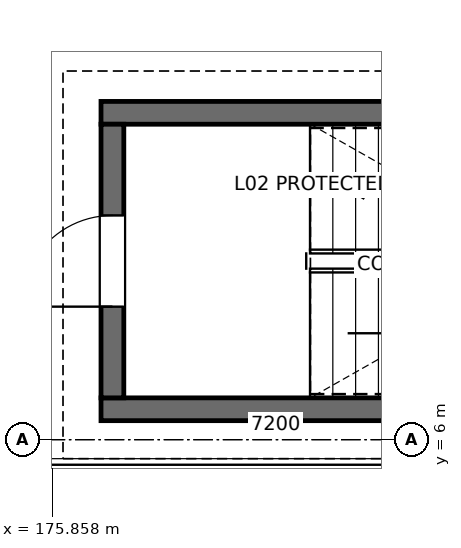
"""IFC4 building model, lengths in metres.
Left out: names, types, materials, properties, quantities, classifications, styles, units other than length and angle.
Written with IfcOpenShell. Run it as: python <this file> out.ifc"""

import sys

from ifc_helpers import new_model, si_unit, direction, frame, frame_2d, origin, place, context, subcontext, project, spatial, rectangle, extrude, element, fill, save


model = new_model("IFC4")
c1 = context("Model", 3, precision=1e-05, world=origin(), true_north=direction((0.0, 1.0)))
c2 = subcontext(c1, "Body", "Model", "MODEL_VIEW")
j1 = project(units=[si_unit("LENGTHUNIT", "METRE"), si_unit("PLANEANGLEUNIT", "RADIAN")], contexts=[c1])
p1 = place(None, origin())
s1 = spatial("IfcSite", under=j1, at=p1, CompositionType="ELEMENT")
p2 = place(p1, origin())
s2 = spatial("IfcBuilding", under=s1, at=p2, CompositionType="ELEMENT")
p3 = place(p2, frame((0.0, 0.0, 9.3)))
s3 = spatial("IfcBuildingStorey", under=s2, at=p3, CompositionType="ELEMENT", Elevation=9.3)
for number, where, z_axis, x_axis in (
    (1, (185.9, 6.4, 0.0), (0.0, 0.0, 1.0), (-1.0, 0.0, 0.0)),
    (2, (176.5, 10.3, 0.0), (0.0, 0.0, 1.0), (1.0, 0.0, 0.0)),
):
    element("IfcWall", number, at=place(p3, frame(where, z_axis=z_axis, x_axis=x_axis)), inside=s3, PredefinedType="SOLIDWALL", context=c2, shape_type="SweptSolid", body=[
        extrude(rectangle(XDim=9.4, YDim=0.3, at=frame_2d((4.7, 0.0))), origin(), (0.0, 0.0, 1.0), 3.6),
    ])
p4 = place(p3, frame((176.65, 6.55, 0.0), z_axis=(0.0, 0.0, 1.0), x_axis=(0.0, 1.0, 0.0)))
e3 = element("IfcWall", 3, at=p4, inside=s3, PredefinedType="SOLIDWALL", context=c2, shape_type="SweptSolid", body=[
    extrude(rectangle(XDim=3.6, YDim=0.3, at=frame_2d((1.8, 0.0))), origin(), (0.0, 0.0, 1.0), 3.6),
])
p5 = place(p4, frame((1.2, 0.0, 0.0)))
e4 = element("IfcOpeningElement", 4, at=p5, cuts=e3, PredefinedType="OPENING", context=c2, shape_type="SweptSolid", body=[
    extrude(rectangle(XDim=1.2, YDim=2.2, at=frame_2d((0.6, 1.1))), frame((0.0, 0.16, 0.0), z_axis=(0.0, -1.0, 0.0), x_axis=(1.0, 0.0, 0.0)), (0.0, 0.0, 1.0), 0.32),
])
p6 = place(p5, origin())
e5 = element("IfcDoor", 5, at=p6, inside=s3, OperationType="SINGLE_SWING_LEFT", PredefinedType="DOOR", context=c2, shape_type="SweptSolid", body=[
    extrude(rectangle(XDim=1.2, YDim=2.2, at=frame_2d((0.6, 1.1))), frame((0.0, 0.025, 0.0), z_axis=(0.0, -1.0, 0.0), x_axis=(1.0, 0.0, 0.0)), (0.0, 0.0, 1.0), 0.05),
])
fill(e4, e5)
save(model, sys.argv[1])
